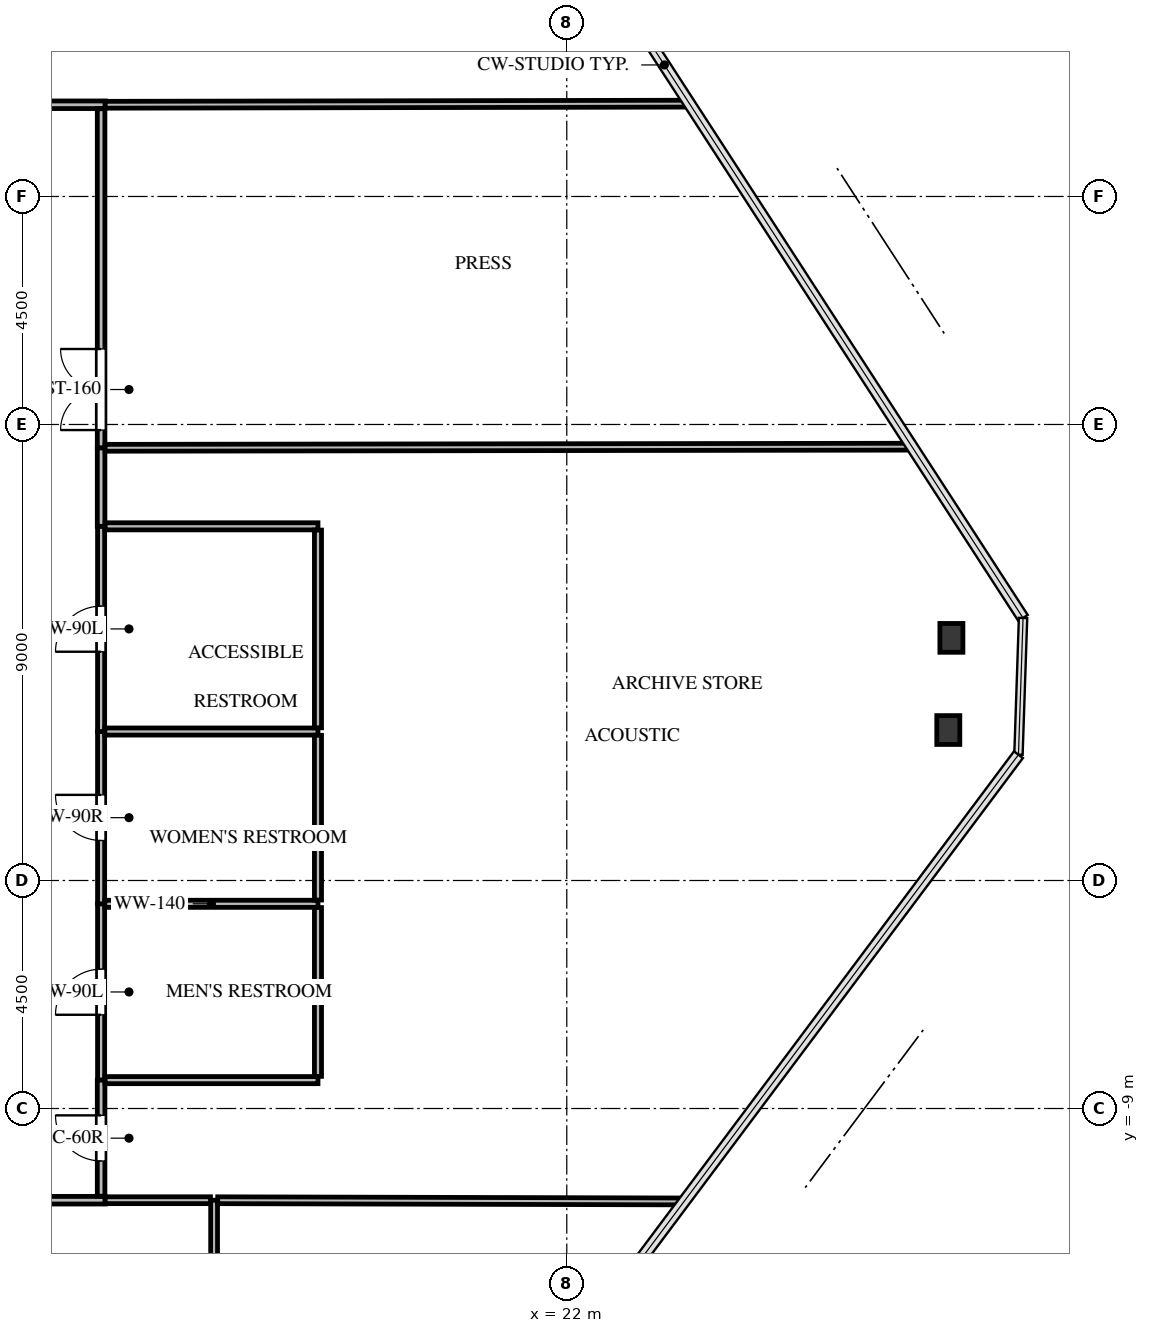
"""IFC4 building model, lengths in metres.
Left out: names, types, materials, properties, quantities, classifications, styles, units other than length and angle.
Written with IfcOpenShell. Run it as: python <this file> out.ifc"""

import sys

from ifc_helpers import new_model, si_unit, direction, frame, frame_2d, origin, origin_2d, place, context, subcontext, project, spatial, rectangle, i_section, extrude, source, transform, mapped, element, fill, save


model = new_model("IFC4")
c1 = context("Model", 3, precision=1e-05, world=origin(), true_north=direction((0.0, 1.0)))
c2 = subcontext(c1, "Body", "Model", "MODEL_VIEW")
j1 = project(units=[si_unit("LENGTHUNIT", "METRE"), si_unit("PLANEANGLEUNIT", "RADIAN")], contexts=[c1])
p1 = place(None, origin())
s1 = spatial("IfcSite", under=j1, at=p1, CompositionType="ELEMENT")
p2 = place(p1, origin())
s2 = spatial("IfcBuilding", under=s1, at=p2, CompositionType="ELEMENT")
p3 = place(p2, frame((0.0, 0.0, 26.8)))
s3 = spatial("IfcBuildingStorey", under=s2, at=p3, CompositionType="ELEMENT", Elevation=26.8)
m1 = source(origin(), c2, "Body", "SweptSolid", [
    extrude(i_section(OverallWidth=0.454, OverallDepth=0.569, WebThickness=0.078, FlangeThickness=0.125, FilletRadius=0.031, at=origin_2d()), origin(), (0.0, 0.0, 1.0), 5.68),
])
for number, where, z_axis, x_axis in (
    (1, (29.591, 0.289, -0.32), (0.0, 0.0, 1.0), (1.0, 0.0, 0.0)),
    (2, (29.529, -1.531, -0.32), (0.0, 0.0, 1.0), (1.0, 0.0, 0.0)),
):
    element("IfcColumn", number, at=place(p3, frame(where, z_axis=z_axis, x_axis=x_axis)), inside=s3, PredefinedType="COLUMN", context=c2, shape_type="MappedRepresentation", body=[
        mapped(m1, transform((0.0, 0.0, 0.0), x_axis=(1.0, 0.0, 0.0), y_axis=(0.0, 1.0, 0.0), z_axis=(0.0, 0.0, 1.0), scale=1.0)),
    ])
p4 = place(p3, frame((12.81, -8.44, 0.0), z_axis=(0.0, 0.0, 1.0), x_axis=(0.0, 1.0, 0.0)))
e3 = element("IfcWall", 3, at=p4, inside=s3, PredefinedType="PARTITIONING", context=c2, shape_type="SweptSolid", body=[
    extrude(rectangle(XDim=3.48, YDim=0.14, at=frame_2d((1.74, 0.0))), origin(), (0.0, 0.0, 1.0), 5.345),
])
p5 = place(p4, frame((1.29, 0.0, 0.0)))
e4 = element("IfcOpeningElement", 4, at=p5, cuts=e3, PredefinedType="OPENING", context=c2, shape_type="SweptSolid", body=[
    extrude(rectangle(XDim=0.9, YDim=2.05, at=frame_2d((0.45, 1.025))), frame((0.0, 0.08, 0.0), z_axis=(0.0, -1.0, 0.0), x_axis=(1.0, 0.0, 0.0)), (0.0, 0.0, 1.0), 0.16),
])
p6 = place(p3, frame((12.81, -4.96, 0.0), z_axis=(0.0, 0.0, 1.0), x_axis=(0.0, 1.0, 0.0)))
e5 = element("IfcWall", 5, at=p6, inside=s3, PredefinedType="PARTITIONING", context=c2, shape_type="SweptSolid", body=[
    extrude(rectangle(XDim=3.4, YDim=0.14, at=frame_2d((1.7, 0.0))), origin(), (0.0, 0.0, 1.0), 5.345),
])
p7 = place(p6, frame((1.25, 0.0, 0.0)))
e6 = element("IfcOpeningElement", 6, at=p7, cuts=e5, PredefinedType="OPENING", context=c2, shape_type="SweptSolid", body=[
    extrude(rectangle(XDim=0.9, YDim=2.05, at=frame_2d((0.45, 1.025))), frame((0.0, 0.08, 0.0), z_axis=(0.0, -1.0, 0.0), x_axis=(1.0, 0.0, 0.0)), (0.0, 0.0, 1.0), 0.16),
])
p8 = place(p3, frame((12.81, -1.56, 0.0), z_axis=(0.0, 0.0, 1.0), x_axis=(0.0, 1.0, 0.0)))
e7 = element("IfcWall", 7, at=p8, inside=s3, PredefinedType="PARTITIONING", context=c2, shape_type="SweptSolid", body=[
    extrude(rectangle(XDim=4.05, YDim=0.14, at=frame_2d((2.025, 0.0))), origin(), (0.0, 0.0, 1.0), 3.53),
])
p9 = place(p8, frame((1.575, 0.0, 0.0)))
e8 = element("IfcOpeningElement", 8, at=p9, cuts=e7, PredefinedType="OPENING", context=c2, shape_type="SweptSolid", body=[
    extrude(rectangle(XDim=0.9, YDim=2.05, at=frame_2d((0.45, 1.025))), frame((0.0, 0.08, 0.0), z_axis=(0.0, -1.0, 0.0), x_axis=(1.0, 0.0, 0.0)), (0.0, 0.0, 1.0), 0.16),
])
p10 = place(p3, frame((12.89, 10.81, 0.0), z_axis=(0.0, 0.0, 1.0), x_axis=(-1.0, 0.0, 0.0)))
e9 = element("IfcWall", 9, at=p10, inside=s3, PredefinedType="PARTITIONING", context=c2, shape_type="SweptSolid", body=[
    extrude(rectangle(XDim=9.85, YDim=0.15, at=frame_2d((4.925, 0.0))), origin(), (0.0, 0.0, 1.0), 3.53),
])
p11 = place(p10, frame((4.45, 0.0, 0.0)))
e10 = element("IfcOpeningElement", 10, at=p11, cuts=e9, PredefinedType="OPENING", context=c2, shape_type="SweptSolid", body=[
    extrude(rectangle(XDim=0.95, YDim=2.1, at=frame_2d((0.475, 1.05))), frame((0.0, 0.085, 0.0), z_axis=(0.0, -1.0, 0.0), x_axis=(1.0, 0.0, 0.0)), (0.0, 0.0, 1.0), 0.17),
])
p12 = place(p3, frame((4.04, -10.81, 0.0), z_axis=(0.0, 0.0, 1.0), x_axis=(1.0, 0.0, 0.0)))
e11 = element("IfcWall", 11, at=p12, inside=s3, PredefinedType="PARTITIONING", context=c2, shape_type="SweptSolid", body=[
    extrude(rectangle(XDim=8.85, YDim=0.15, at=frame_2d((4.425, 0.0))), origin(), (0.0, 0.0, 1.0), 3.53),
])
p13 = place(p12, frame((1.73, 0.0, 0.0)))
e12 = element("IfcOpeningElement", 12, at=p13, cuts=e11, PredefinedType="OPENING", context=c2, shape_type="SweptSolid", body=[
    extrude(rectangle(XDim=1.6, YDim=2.15, at=frame_2d((0.8, 1.075))), frame((0.0, 0.085, 0.0), z_axis=(0.0, -1.0, 0.0), x_axis=(1.0, 0.0, 0.0)), (0.0, 0.0, 1.0), 0.17),
])
p14 = place(p3, frame((12.81, -10.731, 0.0), z_axis=(0.0, 0.0, 1.0), x_axis=(0.0, 1.0, 0.0)))
e13 = element("IfcWall", 13, at=p14, inside=s3, PredefinedType="PARTITIONING", context=c2, shape_type="SweptSolid", body=[
    extrude(rectangle(XDim=2.291, YDim=0.15, at=frame_2d((1.146, 0.0))), origin(), (0.0, 0.0, 1.0), 5.345),
])
p15 = place(p14, frame((0.696, 0.0, 0.0)))
e14 = element("IfcOpeningElement", 14, at=p15, cuts=e13, PredefinedType="OPENING", context=c2, shape_type="SweptSolid", body=[
    extrude(rectangle(XDim=0.9, YDim=2.05, at=frame_2d((0.45, 1.025))), frame((0.0, 0.085, 0.0), z_axis=(0.0, -1.0, 0.0), x_axis=(1.0, 0.0, 0.0)), (0.0, 0.0, 1.0), 0.17),
])
p16 = place(p3, frame((12.81, 2.49, 0.0), z_axis=(0.0, 0.0, 1.0), x_axis=(0.0, 1.0, 0.0)))
e15 = element("IfcWall", 15, at=p16, inside=s3, PredefinedType="PARTITIONING", context=c2, shape_type="SweptSolid", body=[
    extrude(rectangle(XDim=1.55, YDim=0.15, at=frame_2d((0.775, 0.0))), origin(), (0.0, 0.0, 1.0), 5.345),
])
p17 = place(p3, frame((12.81, 4.04, 0.0), z_axis=(0.0, 0.0, 1.0), x_axis=(0.0, 1.0, 0.0)))
e16 = element("IfcWall", 16, at=p17, inside=s3, PredefinedType="PARTITIONING", context=c2, shape_type="SweptSolid", body=[
    extrude(rectangle(XDim=6.691, YDim=0.15, at=frame_2d((3.345, 0.0))), origin(), (0.0, 0.0, 1.0), 5.345),
])
p18 = place(p17, frame((0.35, 0.0, 0.0)))
e17 = element("IfcOpeningElement", 17, at=p18, cuts=e16, PredefinedType="OPENING", context=c2, shape_type="SweptSolid", body=[
    extrude(rectangle(XDim=1.6, YDim=2.15, at=frame_2d((0.8, 1.075))), frame((0.0, 0.085, 0.0), z_axis=(0.0, -1.0, 0.0), x_axis=(1.0, 0.0, 0.0)), (0.0, 0.0, 1.0), 0.17),
])
p19 = place(p3, frame((12.884, -4.96, 0.0), z_axis=(0.0, 0.0, 1.0), x_axis=(1.0, 0.0, 0.0)))
e18 = element("IfcWall", 18, at=p19, inside=s3, PredefinedType="PARTITIONING", context=c2, shape_type="SweptSolid", body=[
    extrude(rectangle(XDim=4.206, YDim=0.14, at=frame_2d((2.103, 0.0))), origin(), (0.0, 0.0, 1.0), 5.345),
])
p20 = place(p3, frame((17.09, -8.44, 0.0), z_axis=(0.0, 0.0, 1.0), x_axis=(-1.0, 0.0, 0.0)))
e19 = element("IfcWall", 19, at=p20, inside=s3, PredefinedType="PARTITIONING", context=c2, shape_type="SweptSolid", body=[
    extrude(rectangle(XDim=4.201, YDim=0.14, at=frame_2d((2.101, 0.0))), origin(), (0.0, 0.0, 1.0), 5.345),
])
p21 = place(p3, frame((17.09, -5.034, 0.0), z_axis=(0.0, 0.0, 1.0), x_axis=(0.0, -1.0, 0.0)))
e20 = element("IfcWall", 20, at=p21, inside=s3, PredefinedType="PARTITIONING", context=c2, shape_type="SweptSolid", body=[
    extrude(rectangle(XDim=3.332, YDim=0.14, at=frame_2d((1.666, 0.0))), origin(), (0.0, 0.0, 1.0), 5.345),
])
p22 = place(p3, frame((12.884, -1.56, 0.0), z_axis=(0.0, 0.0, 1.0), x_axis=(1.0, 0.0, 0.0)))
e21 = element("IfcWall", 21, at=p22, inside=s3, PredefinedType="PARTITIONING", context=c2, shape_type="SweptSolid", body=[
    extrude(rectangle(XDim=4.206, YDim=0.14, at=frame_2d((2.103, 0.0))), origin(), (0.0, 0.0, 1.0), 5.345),
])
p23 = place(p3, frame((17.09, -1.634, 0.0), z_axis=(0.0, 0.0, 1.0), x_axis=(0.0, -1.0, 0.0)))
e22 = element("IfcWall", 22, at=p23, inside=s3, PredefinedType="PARTITIONING", context=c2, shape_type="SweptSolid", body=[
    extrude(rectangle(XDim=3.252, YDim=0.14, at=frame_2d((1.626, 0.0))), origin(), (0.0, 0.0, 1.0), 5.345),
])
p24 = place(p3, frame((12.889, 2.49, 0.0), z_axis=(0.0, 0.0, 1.0), x_axis=(1.0, 0.0, 0.0)))
e23 = element("IfcWall", 23, at=p24, inside=s3, PredefinedType="PARTITIONING", context=c2, shape_type="SweptSolid", body=[
    extrude(rectangle(XDim=4.201, YDim=0.14, at=frame_2d((2.101, 0.0))), origin(), (0.0, 0.0, 1.0), 5.345),
])
p25 = place(p3, frame((17.09, 2.416, 0.0), z_axis=(0.0, 0.0, 1.0), x_axis=(0.0, -1.0, 0.0)))
e24 = element("IfcWall", 24, at=p25, inside=s3, PredefinedType="PARTITIONING", context=c2, shape_type="SweptSolid", body=[
    extrude(rectangle(XDim=3.902, YDim=0.14, at=frame_2d((1.951, 0.0))), origin(), (0.0, 0.0, 1.0), 3.53),
])
p26 = place(p3, frame((24.422, 10.832, 0.0), z_axis=(0.0, 0.0, 1.0), x_axis=(-0.999998264499, -0.001863061508, 0.0)))
e25 = element("IfcWall", 25, at=p26, inside=s3, PredefinedType="PARTITIONING", context=c2, shape_type="SweptSolid", body=[
    extrude(rectangle(XDim=11.532, YDim=0.135, at=frame_2d((5.766, 0.0))), origin(), (0.0, 0.0, 1.0), 3.53),
])
p27 = place(p3, frame((15.04, -10.81, 0.0), z_axis=(0.0, 0.0, 1.0), x_axis=(0.0, -1.0, 0.0)))
e26 = element("IfcWall", 26, at=p27, inside=s3, PredefinedType="PARTITIONING", context=c2, shape_type="SweptSolid", body=[
    extrude(rectangle(XDim=5.955, YDim=0.135, at=frame_2d((2.978, 0.0))), origin(), (0.0, 0.0, 1.0), 5.345),
])
p28 = place(p27, frame((2.528, 0.0, 0.0)))
e27 = element("IfcOpeningElement", 27, at=p28, cuts=e26, PredefinedType="OPENING", context=c2, shape_type="SweptSolid", body=[
    extrude(rectangle(XDim=0.9, YDim=2.05, at=frame_2d((0.45, 1.025))), frame((0.0, 0.078, 0.0), z_axis=(0.0, -1.0, 0.0), x_axis=(1.0, 0.0, 0.0)), (0.0, 0.0, 1.0), 0.155),
])
p29 = place(p3, frame((12.89, -10.81, 0.0), z_axis=(0.0, 0.0, 1.0), x_axis=(1.0, 0.0, 0.0)))
e28 = element("IfcWall", 28, at=p29, inside=s3, PredefinedType="PARTITIONING", context=c2, shape_type="SweptSolid", body=[
    extrude(rectangle(XDim=2.079, YDim=0.135, at=frame_2d((1.039, 0.0))), origin(), (0.0, 0.0, 1.0), 5.345),
])
p30 = place(p3, frame((15.112, -10.81, 0.0), z_axis=(0.0, 0.0, 1.0), x_axis=(0.999996689995, -0.002572935781, 0.0)))
e29 = element("IfcWall", 29, at=p30, inside=s3, PredefinedType="PARTITIONING", context=c2, shape_type="SweptSolid", body=[
    extrude(rectangle(XDim=9.204, YDim=0.135, at=frame_2d((4.602, 0.0))), origin(), (0.0, 0.0, 1.0), 3.53),
])
p31 = place(p3, frame((12.889, 4.04, 0.0), z_axis=(0.0, 0.0, 1.0), x_axis=(0.999999068975, 0.001364568967, 0.0)))
e30 = element("IfcWall", 30, at=p31, inside=s3, PredefinedType="PARTITIONING", context=c2, shape_type="SweptSolid", body=[
    extrude(rectangle(XDim=15.923, YDim=0.135, at=frame_2d((7.962, 0.0))), origin(), (0.0, 0.0, 1.0), 3.53),
])
m2 = source(origin(), c2, "Body", "SweptSolid", [
    extrude(rectangle(XDim=0.9, YDim=2.05, at=frame_2d((0.45, 1.025))), frame((0.0, 0.025, 0.0), z_axis=(0.0, -1.0, 0.0), x_axis=(1.0, 0.0, 0.0)), (0.0, 0.0, 1.0), 0.05),
])
p32 = place(p5, origin())
e31 = element("IfcDoor", 31, at=p32, inside=s3, OperationType="SINGLE_SWING_LEFT", PredefinedType="DOOR", context=c2, shape_type="MappedRepresentation", body=[
    mapped(m2, transform((0.0, 0.0, 0.0), x_axis=(1.0, 0.0, 0.0), y_axis=(0.0, 1.0, 0.0), z_axis=(0.0, 0.0, 1.0), scale=1.0)),
])
fill(e4, e31)
m3 = source(origin(), c2, "Body", "SweptSolid", [
    extrude(rectangle(XDim=0.9, YDim=2.05, at=frame_2d((0.45, 1.025))), frame((0.0, 0.025, 0.0), z_axis=(0.0, -1.0, 0.0), x_axis=(1.0, 0.0, 0.0)), (0.0, 0.0, 1.0), 0.05),
])
p33 = place(p7, origin())
e32 = element("IfcDoor", 32, at=p33, inside=s3, OperationType="SINGLE_SWING_RIGHT", PredefinedType="DOOR", context=c2, shape_type="MappedRepresentation", body=[
    mapped(m3, transform((0.0, 0.0, 0.0), x_axis=(1.0, 0.0, 0.0), y_axis=(0.0, 1.0, 0.0), z_axis=(0.0, 0.0, 1.0), scale=1.0)),
])
fill(e6, e32)
p34 = place(p9, origin())
e33 = element("IfcDoor", 33, at=p34, inside=s3, OperationType="SINGLE_SWING_LEFT", PredefinedType="DOOR", context=c2, shape_type="MappedRepresentation", body=[
    mapped(m2, transform((0.0, 0.0, 0.0), x_axis=(1.0, 0.0, 0.0), y_axis=(0.0, 1.0, 0.0), z_axis=(0.0, 0.0, 1.0), scale=1.0)),
])
fill(e8, e33)
m4 = source(origin(), c2, "Body", "SweptSolid", [
    extrude(rectangle(XDim=0.9, YDim=2.05, at=frame_2d((0.45, 1.025))), frame((0.0, 0.025, 0.0), z_axis=(0.0, -1.0, 0.0), x_axis=(1.0, 0.0, 0.0)), (0.0, 0.0, 1.0), 0.05),
])
p35 = place(p15, origin())
e34 = element("IfcDoor", 34, at=p35, inside=s3, OperationType="SINGLE_SWING_RIGHT", PredefinedType="DOOR", context=c2, shape_type="MappedRepresentation", body=[
    mapped(m4, transform((0.0, 0.0, 0.0), x_axis=(1.0, 0.0, 0.0), y_axis=(0.0, 1.0, 0.0), z_axis=(0.0, 0.0, 1.0), scale=1.0)),
])
fill(e14, e34)
m5 = source(origin(), c2, "Body", "SweptSolid", [
    extrude(rectangle(XDim=1.6, YDim=2.15, at=frame_2d((0.8, 1.075))), frame((0.0, 0.025, 0.0), z_axis=(0.0, -1.0, 0.0), x_axis=(1.0, 0.0, 0.0)), (0.0, 0.0, 1.0), 0.05),
])
p36 = place(p18, origin())
e35 = element("IfcDoor", 35, at=p36, inside=s3, OperationType="DOUBLE_DOOR_SINGLE_SWING", PredefinedType="DOOR", context=c2, shape_type="MappedRepresentation", body=[
    mapped(m5, transform((0.0, 0.0, 0.0), x_axis=(1.0, 0.0, 0.0), y_axis=(0.0, 1.0, 0.0), z_axis=(0.0, 0.0, 1.0), scale=1.0)),
])
fill(e17, e35)
save(model, sys.argv[1])
